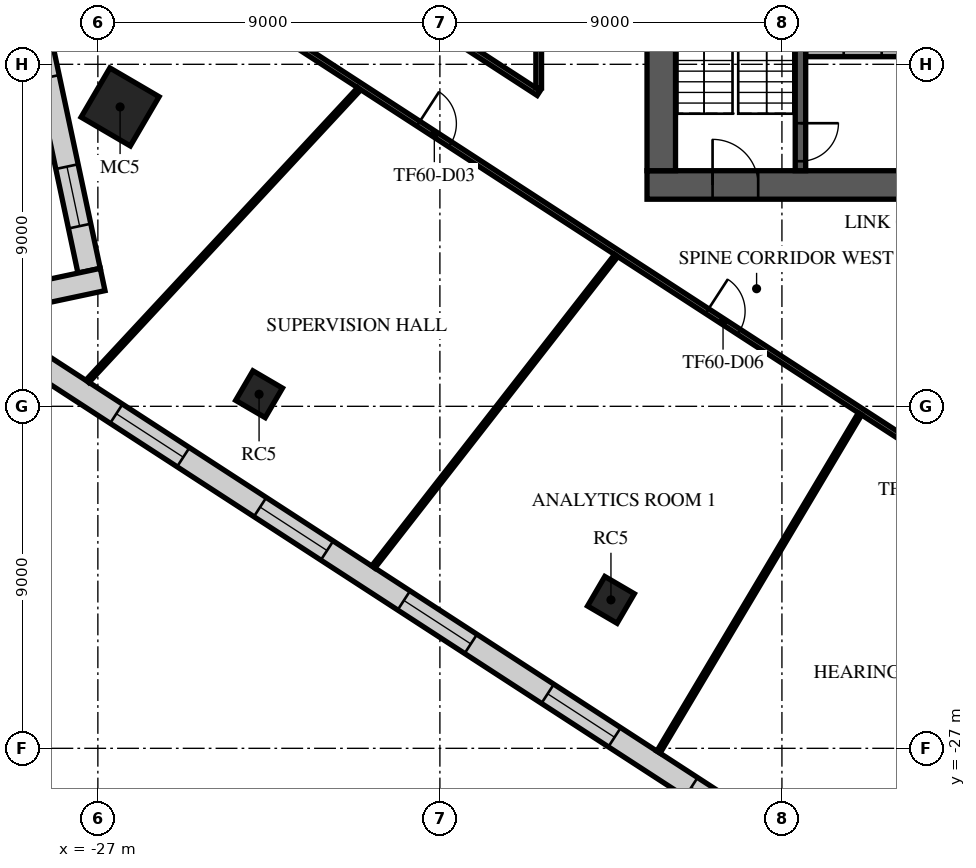
"""IFC4 building model, lengths in metres.
Left out: names, types, materials, properties, quantities, classifications, styles, units other than length and angle.
Written with IfcOpenShell. Run it as: python <this file> out.ifc"""

import sys

from ifc_helpers import new_model, si_unit, direction, frame, frame_2d, origin, origin_2d, place, context, subcontext, project, spatial, rectangle, extrude, element, fill, save


model = new_model("IFC4")
c1 = context("Model", 3, precision=1e-05, world=origin(), true_north=direction((0.0, 1.0)))
c2 = subcontext(c1, "Body", "Model", "MODEL_VIEW")
j1 = project(units=[si_unit("LENGTHUNIT", "METRE"), si_unit("PLANEANGLEUNIT", "RADIAN")], contexts=[c1])
p1 = place(None, origin())
s1 = spatial("IfcSite", under=j1, at=p1, CompositionType="ELEMENT")
p2 = place(p1, origin())
s2 = spatial("IfcBuilding", under=s1, at=p2, CompositionType="ELEMENT")
p3 = place(p2, frame((0.0, 0.0, 254.9)))
s3 = spatial("IfcBuildingStorey", under=s2, at=p3, CompositionType="ELEMENT", Elevation=254.9)
p4 = place(p3, frame((-26.415, -10.122, 0.0), z_axis=(0.0, 0.0, 1.0), x_axis=(0.504643651291, 0.863327739165, 0.0)))
e1 = element("IfcColumn", 1, at=p4, inside=s3, PredefinedType="COLUMN", context=c2, shape_type="SweptSolid", body=[
    extrude(rectangle(XDim=1.5, YDim=1.5, at=origin_2d()), origin(), (0.0, 0.0, 1.0), 4.0),
])
for number, where, z_axis, x_axis in (
    (2, (-22.758, -17.682, 0.0), (0.0, 0.0, 1.0), (0.505, 0.863, 0.0)),
    (3, (-13.499, -23.094, 0.0), (0.0, 0.0, 1.0), (0.505, 0.863, 0.0)),
):
    element("IfcColumn", number, at=place(p3, frame(where, z_axis=z_axis, x_axis=x_axis)), inside=s3, PredefinedType="COLUMN", context=c2, shape_type="SweptSolid", body=[
        extrude(rectangle(XDim=0.9, YDim=0.9, at=origin_2d()), origin(), (0.0, 0.0, 1.0), 4.0),
    ])
p5 = place(p3, frame((-12.55, -12.175, 0.0), z_axis=(0.0, 0.0, 1.0), x_axis=(1.0, 0.0, 0.0)))
e4 = element("IfcWall", 4, at=p5, inside=s3, PredefinedType="SHEAR", context=c2, shape_type="SweptSolid", body=[
    extrude(rectangle(XDim=25.1, YDim=0.75, at=frame_2d((12.55, 0.0))), origin(), (0.0, 0.0, 1.0), 3.64),
])
p6 = place(p5, frame((7.45, 0.0, 0.0)))
e5 = element("IfcOpeningElement", 5, at=p6, cuts=e4, PredefinedType="OPENING", context=c2, shape_type="SweptSolid", body=[
    extrude(rectangle(XDim=2.0, YDim=2.1, at=frame_2d((1.0, 1.05))), frame((0.0, 0.385, 0.0), z_axis=(0.0, -1.0, 0.0), x_axis=(1.0, 0.0, 0.0)), (0.0, 0.0, 1.0), 0.77),
])
p7 = place(p5, frame((17.575, 0.0, 0.0)))
e6 = element("IfcOpeningElement", 6, at=p7, cuts=e4, PredefinedType="OPENING", context=c2, shape_type="SweptSolid", body=[
    extrude(rectangle(XDim=1.2, YDim=2.1, at=frame_2d((0.6, 1.05))), frame((0.0, 0.385, 0.0), z_axis=(0.0, -1.0, 0.0), x_axis=(1.0, 0.0, 0.0)), (0.0, 0.0, 1.0), 0.77),
])
p8 = place(p5, frame((1.725, 0.0, 0.0)))
e7 = element("IfcOpeningElement", 7, at=p8, cuts=e4, PredefinedType="OPENING", context=c2, shape_type="SweptSolid", body=[
    extrude(rectangle(XDim=1.2, YDim=2.1, at=frame_2d((0.6, 1.05))), frame((0.0, 0.385, 0.0), z_axis=(0.0, -1.0, 0.0), x_axis=(1.0, 0.0, 0.0)), (0.0, 0.0, 1.0), 0.77),
])
p9 = place(p5, frame((22.175, 0.0, 0.0)))
e8 = element("IfcOpeningElement", 8, at=p9, cuts=e4, PredefinedType="OPENING", context=c2, shape_type="SweptSolid", body=[
    extrude(rectangle(XDim=1.2, YDim=2.1, at=frame_2d((0.6, 1.05))), frame((0.0, 0.385, 0.0), z_axis=(0.0, -1.0, 0.0), x_axis=(1.0, 0.0, 0.0)), (0.0, 0.0, 1.0), 0.77),
])
p10 = place(p3, frame((-12.175, -11.8, 0.0), z_axis=(0.0, 0.0, 1.0), x_axis=(0.0, 1.0, 0.0)))
e9 = element("IfcWall", 9, at=p10, inside=s3, PredefinedType="SHEAR", context=c2, shape_type="SweptSolid", body=[
    extrude(rectangle(XDim=23.6, YDim=0.75, at=frame_2d((11.8, 0.0))), origin(), (0.0, 0.0, 1.0), 3.64),
])
p11 = place(p10, frame((10.6, 0.0, 0.0)))
e10 = element("IfcOpeningElement", 10, at=p11, cuts=e9, PredefinedType="OPENING", context=c2, shape_type="SweptSolid", body=[
    extrude(rectangle(XDim=2.4, YDim=2.4, at=frame_2d((1.2, 1.2))), frame((0.0, 0.385, 0.0), z_axis=(0.0, -1.0, 0.0), x_axis=(1.0, 0.0, 0.0)), (0.0, 0.0, 1.0), 0.77),
])
p12 = place(p3, frame((-8.512, -4.55, 0.0), z_axis=(0.0, 0.0, 1.0), x_axis=(0.0, -1.0, 0.0)))
e11 = element("IfcWall", 11, at=p12, inside=s3, PredefinedType="SOLIDWALL", context=c2, shape_type="SweptSolid", body=[
    extrude(rectangle(XDim=7.25, YDim=0.275, at=frame_2d((3.625, 0.0))), origin(), (0.0, 0.0, 1.0), 3.64),
])
p13 = place(p12, frame((6.0, 0.0, 0.0)))
e12 = element("IfcOpeningElement", 12, at=p13, cuts=e11, PredefinedType="OPENING", context=c2, shape_type="SweptSolid", body=[
    extrude(rectangle(XDim=1.0, YDim=2.1, at=frame_2d((0.5, 1.05))), frame((0.0, 0.147, 0.0), z_axis=(0.0, -1.0, 0.0), x_axis=(1.0, 0.0, 0.0)), (0.0, 0.0, 1.0), 0.295),
])
p14 = place(p3, frame((-8.37, -8.675, 0.0), z_axis=(0.0, 0.0, 1.0), x_axis=(1.0, 0.0, 0.0)))
e13 = element("IfcWall", 13, at=p14, inside=s3, PredefinedType="PARTITIONING", context=c2, shape_type="SweptSolid", body=[
    extrude(rectangle(XDim=5.49, YDim=0.25, at=frame_2d((2.745, 0.0))), origin(), (0.0, 0.0, 1.0), 3.64),
])
p15 = place(p14, frame((0.995, 0.0, 0.0)))
e14 = element("IfcOpeningElement", 14, at=p15, cuts=e13, PredefinedType="OPENING", context=c2, shape_type="SweptSolid", body=[
    extrude(rectangle(XDim=1.0, YDim=2.1, at=frame_2d((0.5, 1.05))), frame((0.0, 0.135, 0.0), z_axis=(0.0, -1.0, 0.0), x_axis=(1.0, 0.0, 0.0)), (0.0, 0.0, 1.0), 0.27),
])
p16 = place(p14, frame((3.745, 0.0, 0.0)))
e15 = element("IfcOpeningElement", 15, at=p16, cuts=e13, PredefinedType="OPENING", context=c2, shape_type="SweptSolid", body=[
    extrude(rectangle(XDim=1.0, YDim=2.1, at=frame_2d((0.5, 1.05))), frame((0.0, 0.135, 0.0), z_axis=(0.0, -1.0, 0.0), x_axis=(1.0, 0.0, 0.0)), (0.0, 0.0, 1.0), 0.27),
])
p17 = place(p3, frame((-28.894, -6.606, 0.0), z_axis=(0.0, 0.0, 1.0), x_axis=(0.207886494942, -0.978152955943, 0.0)))
e16 = element("IfcWall", 16, at=p17, inside=s3, PredefinedType="STANDARD", context=c2, shape_type="SweptSolid", body=[
    extrude(rectangle(XDim=8.0, YDim=0.6, at=frame_2d((4.0, 0.0))), origin(), (0.0, 0.0, 1.0), 3.64),
])
p18 = place(p17, frame((1.2, 0.0, 0.9)))
e17 = element("IfcOpeningElement", 17, at=p18, cuts=e16, PredefinedType="OPENING", context=c2, shape_type="SweptSolid", body=[
    extrude(rectangle(XDim=1.6, YDim=2.1, at=frame_2d((0.8, 1.05))), frame((0.0, 0.31, 0.0), z_axis=(0.0, -1.0, 0.0), x_axis=(1.0, 0.0, 0.0)), (0.0, 0.0, 1.0), 0.62),
])
p19 = place(p17, frame((5.2, 0.0, 0.9)))
e18 = element("IfcOpeningElement", 18, at=p19, cuts=e16, PredefinedType="OPENING", context=c2, shape_type="SweptSolid", body=[
    extrude(rectangle(XDim=1.6, YDim=2.1, at=frame_2d((0.8, 1.05))), frame((0.0, 0.31, 0.0), z_axis=(0.0, -1.0, 0.0), x_axis=(1.0, 0.0, 0.0)), (0.0, 0.0, 1.0), 0.62),
])
p20 = place(p3, frame((-26.875, -14.663, 0.0), z_axis=(0.0, 0.0, 1.0), x_axis=(-0.978145598061, -0.207921112429, 0.0)))
e19 = element("IfcWall", 19, at=p20, inside=s3, PredefinedType="STANDARD", context=c2, shape_type="SweptSolid", body=[
    extrude(rectangle(XDim=4.636, YDim=0.6, at=frame_2d((2.318, 0.0))), origin(), (0.0, 0.0, 1.0), 3.64),
])
p21 = place(p20, frame((1.818, 0.0, 0.9)))
e20 = element("IfcOpeningElement", 20, at=p21, cuts=e19, PredefinedType="OPENING", context=c2, shape_type="SweptSolid", body=[
    extrude(rectangle(XDim=1.6, YDim=2.1, at=frame_2d((0.8, 1.05))), frame((0.0, 0.31, 0.0), z_axis=(0.0, -1.0, 0.0), x_axis=(1.0, 0.0, 0.0)), (0.0, 0.0, 1.0), 0.62),
])
p22 = place(p3, frame((-31.308, -15.082, 0.0), z_axis=(0.0, 0.0, 1.0), x_axis=(0.838671071298, -0.54463825992, 0.0)))
e21 = element("IfcWall", 21, at=p22, inside=s3, PredefinedType="STANDARD", context=c2, shape_type="SweptSolid", body=[
    extrude(rectangle(XDim=36.086, YDim=0.6, at=frame_2d((18.043, 0.0))), origin(), (0.0, 0.0, 1.0), 3.64),
])
p23 = place(p22, frame((1.205, 0.0, 0.9)))
e22 = element("IfcOpeningElement", 22, at=p23, cuts=e21, PredefinedType="OPENING", context=c2, shape_type="SweptSolid", body=[
    extrude(rectangle(XDim=2.1, YDim=2.1, at=frame_2d((1.05, 1.05))), frame((0.0, 0.31, 0.0), z_axis=(0.0, -1.0, 0.0), x_axis=(1.0, 0.0, 0.0)), (0.0, 0.0, 1.0), 0.62),
])
p24 = place(p22, frame((5.716, 0.0, 0.9)))
e23 = element("IfcOpeningElement", 23, at=p24, cuts=e21, PredefinedType="OPENING", context=c2, shape_type="SweptSolid", body=[
    extrude(rectangle(XDim=2.1, YDim=2.1, at=frame_2d((1.05, 1.05))), frame((0.0, 0.31, 0.0), z_axis=(0.0, -1.0, 0.0), x_axis=(1.0, 0.0, 0.0)), (0.0, 0.0, 1.0), 0.62),
])
p25 = place(p22, frame((10.227, 0.0, 0.9)))
e24 = element("IfcOpeningElement", 24, at=p25, cuts=e21, PredefinedType="OPENING", context=c2, shape_type="SweptSolid", body=[
    extrude(rectangle(XDim=2.1, YDim=2.1, at=frame_2d((1.05, 1.05))), frame((0.0, 0.31, 0.0), z_axis=(0.0, -1.0, 0.0), x_axis=(1.0, 0.0, 0.0)), (0.0, 0.0, 1.0), 0.62),
])
p26 = place(p22, frame((14.738, 0.0, 0.9)))
e25 = element("IfcOpeningElement", 25, at=p26, cuts=e21, PredefinedType="OPENING", context=c2, shape_type="SweptSolid", body=[
    extrude(rectangle(XDim=2.1, YDim=2.1, at=frame_2d((1.05, 1.05))), frame((0.0, 0.31, 0.0), z_axis=(0.0, -1.0, 0.0), x_axis=(1.0, 0.0, 0.0)), (0.0, 0.0, 1.0), 0.62),
])
p27 = place(p22, frame((19.249, 0.0, 0.9)))
e26 = element("IfcOpeningElement", 26, at=p27, cuts=e21, PredefinedType="OPENING", context=c2, shape_type="SweptSolid", body=[
    extrude(rectangle(XDim=2.1, YDim=2.1, at=frame_2d((1.05, 1.05))), frame((0.0, 0.31, 0.0), z_axis=(0.0, -1.0, 0.0), x_axis=(1.0, 0.0, 0.0)), (0.0, 0.0, 1.0), 0.62),
])
p28 = place(p22, frame((23.759, 0.0, 0.9)))
e27 = element("IfcOpeningElement", 27, at=p28, cuts=e21, PredefinedType="OPENING", context=c2, shape_type="SweptSolid", body=[
    extrude(rectangle(XDim=2.1, YDim=2.1, at=frame_2d((1.05, 1.05))), frame((0.0, 0.31, 0.0), z_axis=(0.0, -1.0, 0.0), x_axis=(1.0, 0.0, 0.0)), (0.0, 0.0, 1.0), 0.62),
])
p29 = place(p22, frame((28.27, 0.0, 0.9)))
e28 = element("IfcOpeningElement", 28, at=p29, cuts=e21, PredefinedType="OPENING", context=c2, shape_type="SweptSolid", body=[
    extrude(rectangle(XDim=2.1, YDim=2.1, at=frame_2d((1.05, 1.05))), frame((0.0, 0.31, 0.0), z_axis=(0.0, -1.0, 0.0), x_axis=(1.0, 0.0, 0.0)), (0.0, 0.0, 1.0), 0.62),
])
p30 = place(p22, frame((32.781, 0.0, 0.9)))
e29 = element("IfcOpeningElement", 29, at=p30, cuts=e21, PredefinedType="OPENING", context=c2, shape_type="SweptSolid", body=[
    extrude(rectangle(XDim=2.1, YDim=2.1, at=frame_2d((1.05, 1.05))), frame((0.0, 0.31, 0.0), z_axis=(0.0, -1.0, 0.0), x_axis=(1.0, 0.0, 0.0)), (0.0, 0.0, 1.0), 0.62),
])
p31 = place(p3, frame((-26.791, -5.221, 0.0), z_axis=(0.0, 0.0, 1.0), x_axis=(0.838671905754, -0.544636974965, 0.0)))
e30 = element("IfcWall", 30, at=p31, inside=s3, PredefinedType="PARTITIONING", context=c2, shape_type="SweptSolid", body=[
    extrude(rectangle(XDim=39.325, YDim=0.15, at=frame_2d((19.663, 0.0))), origin(), (0.0, 0.0, 1.0), 3.04),
])
p32 = place(p31, frame((2.05, 0.0, 0.0)))
e31 = element("IfcOpeningElement", 31, at=p32, cuts=e30, PredefinedType="OPENING", context=c2, shape_type="SweptSolid", body=[
    extrude(rectangle(XDim=1.0, YDim=2.1, at=frame_2d((0.5, 1.05))), frame((0.0, 0.085, 0.0), z_axis=(0.0, -1.0, 0.0), x_axis=(1.0, 0.0, 0.0)), (0.0, 0.0, 1.0), 0.17),
])
p33 = place(p31, frame((9.807, 0.0, 0.0)))
e32 = element("IfcOpeningElement", 32, at=p33, cuts=e30, PredefinedType="OPENING", context=c2, shape_type="SweptSolid", body=[
    extrude(rectangle(XDim=1.0, YDim=2.1, at=frame_2d((0.5, 1.05))), frame((0.0, 0.085, 0.0), z_axis=(0.0, -1.0, 0.0), x_axis=(1.0, 0.0, 0.0)), (0.0, 0.0, 1.0), 0.17),
])
p34 = place(p31, frame((18.866, 0.0, 0.0)))
e33 = element("IfcOpeningElement", 33, at=p34, cuts=e30, PredefinedType="OPENING", context=c2, shape_type="SweptSolid", body=[
    extrude(rectangle(XDim=1.0, YDim=2.1, at=frame_2d((0.5, 1.05))), frame((0.0, 0.085, 0.0), z_axis=(0.0, -1.0, 0.0), x_axis=(1.0, 0.0, 0.0)), (0.0, 0.0, 1.0), 0.17),
])
p35 = place(p31, frame((25.009, 0.0, 0.0)))
e34 = element("IfcOpeningElement", 34, at=p35, cuts=e30, PredefinedType="OPENING", context=c2, shape_type="SweptSolid", body=[
    extrude(rectangle(XDim=1.0, YDim=2.1, at=frame_2d((0.5, 1.05))), frame((0.0, 0.085, 0.0), z_axis=(0.0, -1.0, 0.0), x_axis=(1.0, 0.0, 0.0)), (0.0, 0.0, 1.0), 0.17),
])
p36 = place(p31, frame((36.069, 0.0, 0.0)))
e35 = element("IfcOpeningElement", 35, at=p36, cuts=e30, PredefinedType="OPENING", context=c2, shape_type="SweptSolid", body=[
    extrude(rectangle(XDim=1.8, YDim=2.1, at=frame_2d((0.9, 1.05))), frame((0.0, 0.085, 0.0), z_axis=(0.0, -1.0, 0.0), x_axis=(1.0, 0.0, 0.0)), (0.0, 0.0, 1.0), 0.17),
])
p37 = place(p3, frame((-25.484, -3.209, 0.0), z_axis=(0.0, 0.0, 1.0), x_axis=(0.838696356723, -0.544599321721, 0.0)))
e36 = element("IfcWall", 36, at=p37, inside=s3, PredefinedType="PARTITIONING", context=c2, shape_type="SweptSolid", body=[
    extrude(rectangle(XDim=12.024, YDim=0.15, at=frame_2d((6.012, 0.0))), origin(), (0.0, 0.0, 1.0), 3.04),
])
p38 = place(p3, frame((-15.4, -9.619, 0.0), z_axis=(0.0, 0.0, 1.0), x_axis=(0.0, 1.0, 0.0)))
e37 = element("IfcWall", 37, at=p38, inside=s3, PredefinedType="PARTITIONING", context=c2, shape_type="SweptSolid", body=[
    extrude(rectangle(XDim=25.019, YDim=0.15, at=frame_2d((12.509, 0.0))), origin(), (0.0, 0.0, 1.0), 3.24),
])
p39 = place(p38, frame((9.532, 0.0, 0.0)))
e38 = element("IfcOpeningElement", 38, at=p39, cuts=e37, PredefinedType="OPENING", context=c2, shape_type="SweptSolid", body=[
    extrude(rectangle(XDim=1.8, YDim=2.1, at=frame_2d((0.9, 1.05))), frame((0.0, 0.085, 0.0), z_axis=(0.0, -1.0, 0.0), x_axis=(1.0, 0.0, 0.0)), (0.0, 0.0, 1.0), 0.17),
])
p40 = place(p38, frame((16.437, 0.0, 0.0)))
e39 = element("IfcOpeningElement", 39, at=p40, cuts=e37, PredefinedType="OPENING", context=c2, shape_type="SweptSolid", body=[
    extrude(rectangle(XDim=1.0, YDim=2.1, at=frame_2d((0.5, 1.05))), frame((0.0, 0.085, 0.0), z_axis=(0.0, -1.0, 0.0), x_axis=(1.0, 0.0, 0.0)), (0.0, 0.0, 1.0), 0.17),
])
p41 = place(p38, frame((3.05, 0.0, 0.0)))
e40 = element("IfcOpeningElement", 40, at=p41, cuts=e37, PredefinedType="OPENING", context=c2, shape_type="SweptSolid", body=[
    extrude(rectangle(XDim=1.0, YDim=2.1, at=frame_2d((0.5, 1.05))), frame((0.0, 0.085, 0.0), z_axis=(0.0, -1.0, 0.0), x_axis=(1.0, 0.0, 0.0)), (0.0, 0.0, 1.0), 0.17),
])
p42 = place(p3, frame((-27.274, -17.341, 0.0), z_axis=(0.0, 0.0, 1.0), x_axis=(0.680597347882, 0.732657662252, 0.0)))
e41 = element("IfcWall", 41, at=p42, inside=s3, PredefinedType="PARTITIONING", context=c2, shape_type="SweptSolid", body=[
    extrude(rectangle(XDim=10.5, YDim=0.1, at=frame_2d((5.25, 0.0))), origin(), (0.0, 0.0, 1.0), 3.04),
])
p43 = place(p3, frame((-19.751, -22.226, 0.0), z_axis=(0.0, 0.0, 1.0), x_axis=(0.615010755177, 0.788518719509, 0.0)))
e42 = element("IfcWall", 42, at=p43, inside=s3, PredefinedType="PARTITIONING", context=c2, shape_type="SweptSolid", body=[
    extrude(rectangle(XDim=10.387, YDim=0.1, at=frame_2d((5.194, 0.0))), origin(), (0.0, 0.0, 1.0), 3.04),
])
p44 = place(p3, frame((-12.248, -27.099, 0.0), z_axis=(0.0, 0.0, 1.0), x_axis=(0.511779266972, 0.859116978005, 0.0)))
e43 = element("IfcWall", 43, at=p44, inside=s3, PredefinedType="PARTITIONING", context=c2, shape_type="SweptSolid", body=[
    extrude(rectangle(XDim=10.358, YDim=0.1, at=frame_2d((5.179, 0.0))), origin(), (0.0, 0.0, 1.0), 3.04),
])
p45 = place(p8, origin())
e44 = element("IfcDoor", 44, at=p45, inside=s3, OperationType="SINGLE_SWING_LEFT", PredefinedType="DOOR", context=c2, shape_type="SweptSolid", body=[
    extrude(rectangle(XDim=1.2, YDim=2.1, at=frame_2d((0.6, 1.05))), frame((0.0, 0.025, 0.0), z_axis=(0.0, -1.0, 0.0), x_axis=(1.0, 0.0, 0.0)), (0.0, 0.0, 1.0), 0.05),
])
fill(e7, e44)
p46 = place(p13, origin())
e45 = element("IfcDoor", 45, at=p46, inside=s3, OperationType="SINGLE_SWING_LEFT", PredefinedType="DOOR", context=c2, shape_type="SweptSolid", body=[
    extrude(rectangle(XDim=1.0, YDim=2.1, at=frame_2d((0.5, 1.05))), frame((0.0, 0.025, 0.0), z_axis=(0.0, -1.0, 0.0), x_axis=(1.0, 0.0, 0.0)), (0.0, 0.0, 1.0), 0.05),
])
fill(e12, e45)
p47 = place(p15, origin())
e46 = element("IfcDoor", 46, at=p47, inside=s3, OperationType="SINGLE_SWING_LEFT", PredefinedType="DOOR", context=c2, shape_type="SweptSolid", body=[
    extrude(rectangle(XDim=1.0, YDim=2.1, at=frame_2d((0.5, 1.05))), frame((0.0, 0.025, 0.0), z_axis=(0.0, -1.0, 0.0), x_axis=(1.0, 0.0, 0.0)), (0.0, 0.0, 1.0), 0.05),
])
fill(e14, e46)
p48 = place(p19, origin())
e47 = element("IfcWindow", 47, at=p48, inside=s3, PartitioningType="SINGLE_PANEL", PredefinedType="WINDOW", context=c2, shape_type="SweptSolid", body=[
    extrude(rectangle(XDim=1.6, YDim=2.1, at=frame_2d((0.8, 1.05))), frame((0.0, 0.03, 0.0), z_axis=(0.0, -1.0, 0.0), x_axis=(1.0, 0.0, 0.0)), (0.0, 0.0, 1.0), 0.06),
])
fill(e18, e47)
p49 = place(p24, origin())
e48 = element("IfcWindow", 48, at=p49, inside=s3, PartitioningType="SINGLE_PANEL", PredefinedType="WINDOW", context=c2, shape_type="SweptSolid", body=[
    extrude(rectangle(XDim=2.1, YDim=2.1, at=frame_2d((1.05, 1.05))), frame((0.0, 0.03, 0.0), z_axis=(0.0, -1.0, 0.0), x_axis=(1.0, 0.0, 0.0)), (0.0, 0.0, 1.0), 0.06),
])
fill(e23, e48)
p50 = place(p25, origin())
e49 = element("IfcWindow", 49, at=p50, inside=s3, PartitioningType="SINGLE_PANEL", PredefinedType="WINDOW", context=c2, shape_type="SweptSolid", body=[
    extrude(rectangle(XDim=2.1, YDim=2.1, at=frame_2d((1.05, 1.05))), frame((0.0, 0.03, 0.0), z_axis=(0.0, -1.0, 0.0), x_axis=(1.0, 0.0, 0.0)), (0.0, 0.0, 1.0), 0.06),
])
fill(e24, e49)
p51 = place(p26, origin())
e50 = element("IfcWindow", 50, at=p51, inside=s3, PartitioningType="SINGLE_PANEL", PredefinedType="WINDOW", context=c2, shape_type="SweptSolid", body=[
    extrude(rectangle(XDim=2.1, YDim=2.1, at=frame_2d((1.05, 1.05))), frame((0.0, 0.03, 0.0), z_axis=(0.0, -1.0, 0.0), x_axis=(1.0, 0.0, 0.0)), (0.0, 0.0, 1.0), 0.06),
])
fill(e25, e50)
p52 = place(p27, origin())
e51 = element("IfcWindow", 51, at=p52, inside=s3, PartitioningType="SINGLE_PANEL", PredefinedType="WINDOW", context=c2, shape_type="SweptSolid", body=[
    extrude(rectangle(XDim=2.1, YDim=2.1, at=frame_2d((1.05, 1.05))), frame((0.0, 0.03, 0.0), z_axis=(0.0, -1.0, 0.0), x_axis=(1.0, 0.0, 0.0)), (0.0, 0.0, 1.0), 0.06),
])
fill(e26, e51)
p53 = place(p28, origin())
e52 = element("IfcWindow", 52, at=p53, inside=s3, PartitioningType="SINGLE_PANEL", PredefinedType="WINDOW", context=c2, shape_type="SweptSolid", body=[
    extrude(rectangle(XDim=2.1, YDim=2.1, at=frame_2d((1.05, 1.05))), frame((0.0, 0.03, 0.0), z_axis=(0.0, -1.0, 0.0), x_axis=(1.0, 0.0, 0.0)), (0.0, 0.0, 1.0), 0.06),
])
fill(e27, e52)
p54 = place(p33, frame((1.0, 0.0, 0.0), z_axis=(0.0, 0.0, 1.0), x_axis=(-1.0, 0.0, 0.0)))
e53 = element("IfcDoor", 53, at=p54, inside=s3, OperationType="SINGLE_SWING_LEFT", PredefinedType="DOOR", context=c2, shape_type="SweptSolid", body=[
    extrude(rectangle(XDim=1.0, YDim=2.1, at=frame_2d((0.5, 1.05))), frame((0.0, 0.025, 0.0), z_axis=(0.0, -1.0, 0.0), x_axis=(1.0, 0.0, 0.0)), (0.0, 0.0, 1.0), 0.05),
])
fill(e32, e53)
p55 = place(p34, frame((1.0, 0.0, 0.0), z_axis=(0.0, 0.0, 1.0), x_axis=(-1.0, 0.0, 0.0)))
e54 = element("IfcDoor", 54, at=p55, inside=s3, OperationType="SINGLE_SWING_RIGHT", PredefinedType="DOOR", context=c2, shape_type="SweptSolid", body=[
    extrude(rectangle(XDim=1.0, YDim=2.1, at=frame_2d((0.5, 1.05))), frame((0.0, 0.025, 0.0), z_axis=(0.0, -1.0, 0.0), x_axis=(1.0, 0.0, 0.0)), (0.0, 0.0, 1.0), 0.05),
])
fill(e33, e54)
save(model, sys.argv[1])
